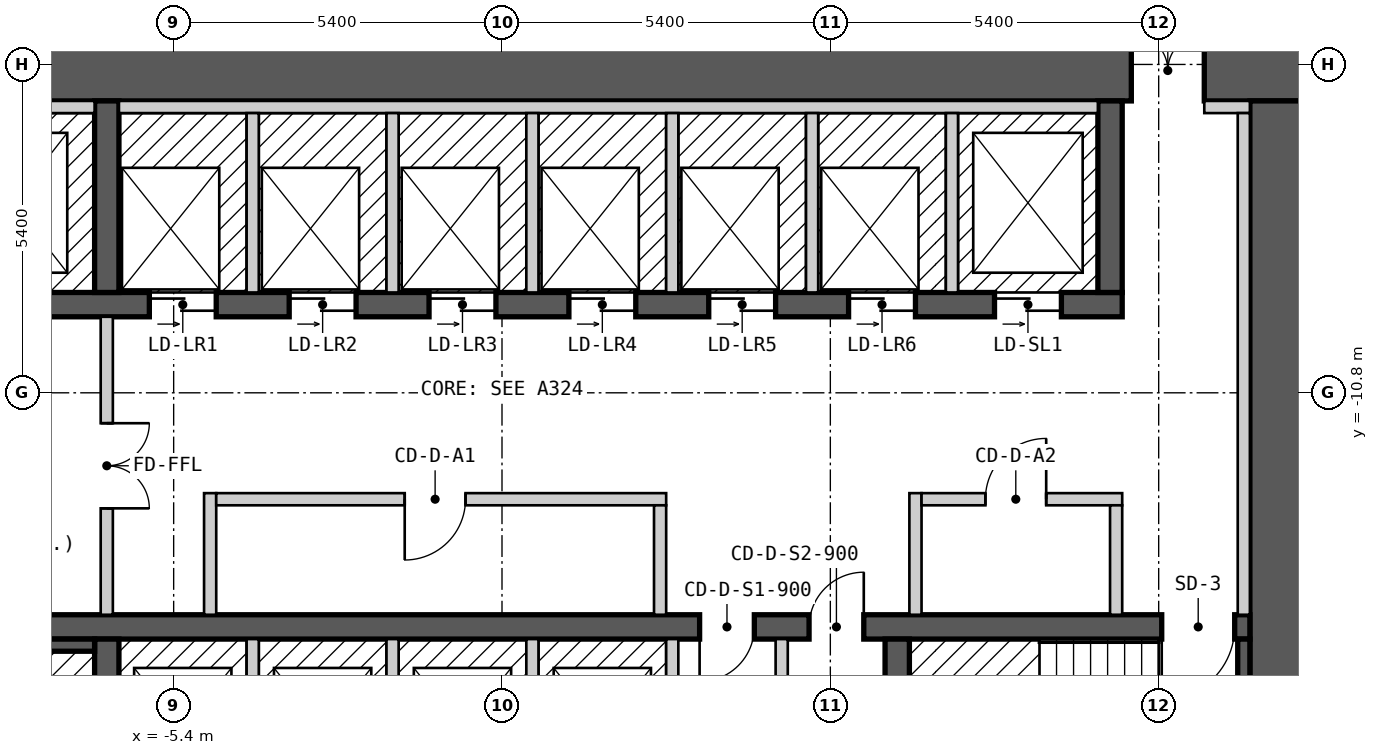
"""IFC4 building model, lengths in metres.
Left out: names, types, materials, properties, quantities, classifications, styles, units other than length and angle.
Written with IfcOpenShell. Run it as: python <this file> out.ifc"""

import sys

from ifc_helpers import new_model, si_unit, direction, frame, frame_2d, origin, place, context, subcontext, project, spatial, rectangle, extrude, element, fill, save


model = new_model("IFC4")
c1 = context("Model", 3, precision=1e-05, world=origin(), true_north=direction((0.0, 1.0)))
c2 = subcontext(c1, "Body", "Model", "MODEL_VIEW")
j1 = project(units=[si_unit("LENGTHUNIT", "METRE"), si_unit("PLANEANGLEUNIT", "RADIAN")], contexts=[c1])
p1 = place(None, origin())
s1 = spatial("IfcSite", under=j1, at=p1, CompositionType="ELEMENT")
p2 = place(p1, origin())
s2 = spatial("IfcBuilding", under=s1, at=p2, CompositionType="ELEMENT")
p3 = place(p2, frame((0.0, 0.0, 81.0)))
s3 = spatial("IfcBuildingStorey", under=s2, at=p3, CompositionType="ELEMENT", Elevation=81.0)
p4 = place(p3, frame((-13.3, -5.5, 0.0), z_axis=(0.0, 0.0, 1.0), x_axis=(1.0, 0.0, 0.0)))
e1 = element("IfcWall", 1, at=p4, inside=s3, PredefinedType="SHEAR", context=c2, shape_type="SweptSolid", body=[
    extrude(rectangle(XDim=26.6, YDim=1.0, at=frame_2d((13.3, 0.0))), origin(), (0.0, 0.0, 1.0), 2.7),
])
p5 = place(p4, frame((23.65, 0.0, 0.0)))
e2 = element("IfcOpeningElement", 2, at=p5, cuts=e1, PredefinedType="OPENING", context=c2, shape_type="SweptSolid", body=[
    extrude(rectangle(XDim=1.2, YDim=2.1, at=frame_2d((0.6, 1.05))), frame((0.0, 0.51, 0.0), z_axis=(0.0, -1.0, 0.0), x_axis=(1.0, 0.0, 0.0)), (0.0, 0.0, 1.0), 1.02),
])
p6 = place(p3, frame((12.8, -18.0, 0.0), z_axis=(0.0, 0.0, 1.0), x_axis=(0.0, 1.0, 0.0)))
e3 = element("IfcWall", 3, at=p6, inside=s3, PredefinedType="SHEAR", context=c2, shape_type="SweptSolid", body=[
    extrude(rectangle(XDim=12.0, YDim=1.0, at=frame_2d((6.0, 0.0))), origin(), (0.0, 0.0, 1.0), 2.7),
])
p7 = place(p3, frame((-12.3, -14.65, 0.0), z_axis=(0.0, 0.0, 1.0), x_axis=(1.0, 0.0, 0.0)))
e4 = element("IfcWall", 4, at=p7, inside=s3, PredefinedType="SHEAR", context=c2, shape_type="SweptSolid", body=[
    extrude(rectangle(XDim=24.6, YDim=0.4, at=frame_2d((12.3, 0.0))), origin(), (0.0, 0.0, 1.0), 2.7),
])
p8 = place(p7, frame((1.5, 0.0, 0.0), z_axis=(0.0, 0.0, 1.0), x_axis=(-1.0, 0.0, 0.0)))
e5 = element("IfcOpeningElement", 5, at=p8, cuts=e4, PredefinedType="OPENING", context=c2, shape_type="SweptSolid", body=[
    extrude(rectangle(XDim=1.2, YDim=2.1, at=frame_2d((0.6, 1.05))), frame((0.0, 0.21, 0.0), z_axis=(0.0, -1.0, 0.0), x_axis=(1.0, 0.0, 0.0)), (0.0, 0.0, 1.0), 0.42),
])
p9 = place(p7, frame((24.35, 0.0, 0.0), z_axis=(0.0, 0.0, 1.0), x_axis=(-1.0, 0.0, 0.0)))
e6 = element("IfcOpeningElement", 6, at=p9, cuts=e4, PredefinedType="OPENING", context=c2, shape_type="SweptSolid", body=[
    extrude(rectangle(XDim=1.2, YDim=2.1, at=frame_2d((0.6, 1.05))), frame((0.0, 0.21, 0.0), z_axis=(0.0, -1.0, 0.0), x_axis=(1.0, 0.0, 0.0)), (0.0, 0.0, 1.0), 0.42),
])
p10 = place(p7, frame((16.45, 0.0, 0.0), z_axis=(0.0, 0.0, 1.0), x_axis=(-1.0, 0.0, 0.0)))
e7 = element("IfcOpeningElement", 7, at=p10, cuts=e4, PredefinedType="OPENING", context=c2, shape_type="SweptSolid", body=[
    extrude(rectangle(XDim=0.9, YDim=2.1, at=frame_2d((0.45, 1.05))), frame((0.0, 0.21, 0.0), z_axis=(0.0, -1.0, 0.0), x_axis=(1.0, 0.0, 0.0)), (0.0, 0.0, 1.0), 0.42),
])
p11 = place(p7, frame((18.25, 0.0, 0.0), z_axis=(0.0, 0.0, 1.0), x_axis=(-1.0, 0.0, 0.0)))
e8 = element("IfcOpeningElement", 8, at=p11, cuts=e4, PredefinedType="OPENING", context=c2, shape_type="SweptSolid", body=[
    extrude(rectangle(XDim=0.9, YDim=2.1, at=frame_2d((0.45, 1.05))), frame((0.0, 0.21, 0.0), z_axis=(0.0, -1.0, 0.0), x_axis=(1.0, 0.0, 0.0)), (0.0, 0.0, 1.0), 0.42),
])
p12 = place(p3, frame((-12.3, -9.35, 0.0), z_axis=(0.0, 0.0, 1.0), x_axis=(1.0, 0.0, 0.0)))
e9 = element("IfcWall", 9, at=p12, inside=s3, PredefinedType="SHEAR", context=c2, shape_type="SweptSolid", body=[
    extrude(rectangle(XDim=22.5, YDim=0.4, at=frame_2d((11.25, 0.0))), origin(), (0.0, 0.0, 1.0), 2.7),
])
p13 = place(p12, frame((0.9, 0.0, 0.0)))
e10 = element("IfcOpeningElement", 10, at=p13, cuts=e9, PredefinedType="OPENING", context=c2, shape_type="SweptSolid", body=[
    extrude(rectangle(XDim=1.1, YDim=2.1, at=frame_2d((0.55, 1.05))), frame((0.0, 0.21, 0.0), z_axis=(0.0, -1.0, 0.0), x_axis=(1.0, 0.0, 0.0)), (0.0, 0.0, 1.0), 0.42),
])
p14 = place(p12, frame((3.7, 0.0, 0.0)))
e11 = element("IfcOpeningElement", 11, at=p14, cuts=e9, PredefinedType="OPENING", context=c2, shape_type="SweptSolid", body=[
    extrude(rectangle(XDim=1.1, YDim=2.1, at=frame_2d((0.55, 1.05))), frame((0.0, 0.21, 0.0), z_axis=(0.0, -1.0, 0.0), x_axis=(1.0, 0.0, 0.0)), (0.0, 0.0, 1.0), 0.42),
])
p15 = place(p12, frame((6.5, 0.0, 0.0)))
e12 = element("IfcOpeningElement", 12, at=p15, cuts=e9, PredefinedType="OPENING", context=c2, shape_type="SweptSolid", body=[
    extrude(rectangle(XDim=1.1, YDim=2.1, at=frame_2d((0.55, 1.05))), frame((0.0, 0.21, 0.0), z_axis=(0.0, -1.0, 0.0), x_axis=(1.0, 0.0, 0.0)), (0.0, 0.0, 1.0), 0.42),
])
p16 = place(p12, frame((8.8, 0.0, 0.0)))
e13 = element("IfcOpeningElement", 13, at=p16, cuts=e9, PredefinedType="OPENING", context=c2, shape_type="SweptSolid", body=[
    extrude(rectangle(XDim=1.1, YDim=2.1, at=frame_2d((0.55, 1.05))), frame((0.0, 0.21, 0.0), z_axis=(0.0, -1.0, 0.0), x_axis=(1.0, 0.0, 0.0)), (0.0, 0.0, 1.0), 0.42),
])
p17 = place(p12, frame((11.1, 0.0, 0.0)))
e14 = element("IfcOpeningElement", 14, at=p17, cuts=e9, PredefinedType="OPENING", context=c2, shape_type="SweptSolid", body=[
    extrude(rectangle(XDim=1.1, YDim=2.1, at=frame_2d((0.55, 1.05))), frame((0.0, 0.21, 0.0), z_axis=(0.0, -1.0, 0.0), x_axis=(1.0, 0.0, 0.0)), (0.0, 0.0, 1.0), 0.42),
])
p18 = place(p12, frame((13.4, 0.0, 0.0)))
e15 = element("IfcOpeningElement", 15, at=p18, cuts=e9, PredefinedType="OPENING", context=c2, shape_type="SweptSolid", body=[
    extrude(rectangle(XDim=1.1, YDim=2.1, at=frame_2d((0.55, 1.05))), frame((0.0, 0.21, 0.0), z_axis=(0.0, -1.0, 0.0), x_axis=(1.0, 0.0, 0.0)), (0.0, 0.0, 1.0), 0.42),
])
p19 = place(p12, frame((15.7, 0.0, 0.0)))
e16 = element("IfcOpeningElement", 16, at=p19, cuts=e9, PredefinedType="OPENING", context=c2, shape_type="SweptSolid", body=[
    extrude(rectangle(XDim=1.1, YDim=2.1, at=frame_2d((0.55, 1.05))), frame((0.0, 0.21, 0.0), z_axis=(0.0, -1.0, 0.0), x_axis=(1.0, 0.0, 0.0)), (0.0, 0.0, 1.0), 0.42),
])
p20 = place(p12, frame((18.0, 0.0, 0.0)))
e17 = element("IfcOpeningElement", 17, at=p20, cuts=e9, PredefinedType="OPENING", context=c2, shape_type="SweptSolid", body=[
    extrude(rectangle(XDim=1.1, YDim=2.1, at=frame_2d((0.55, 1.05))), frame((0.0, 0.21, 0.0), z_axis=(0.0, -1.0, 0.0), x_axis=(1.0, 0.0, 0.0)), (0.0, 0.0, 1.0), 0.42),
])
p21 = place(p12, frame((20.4, 0.0, 0.0)))
e18 = element("IfcOpeningElement", 18, at=p21, cuts=e9, PredefinedType="OPENING", context=c2, shape_type="SweptSolid", body=[
    extrude(rectangle(XDim=1.1, YDim=2.1, at=frame_2d((0.55, 1.05))), frame((0.0, 0.21, 0.0), z_axis=(0.0, -1.0, 0.0), x_axis=(1.0, 0.0, 0.0)), (0.0, 0.0, 1.0), 0.42),
])
for number, where, z_axis, x_axis in (
    (19, (-6.5, -18.0, 0.0), (0.0, 0.0, 1.0), (0.0, 1.0, 0.0)),
    (20, (6.5, -18.0, 0.0), (0.0, 0.0, 1.0), (0.0, 1.0, 0.0)),
    (21, (-6.5, -9.15, 0.0), (0.0, 0.0, 1.0), (0.0, 1.0, 0.0)),
    (22, (10.0, -9.15, 0.0), (0.0, 0.0, 1.0), (0.0, 1.0, 0.0)),
):
    element("IfcWall", number, at=place(p3, frame(where, z_axis=z_axis, x_axis=x_axis)), inside=s3, PredefinedType="SHEAR", context=c2, shape_type="SweptSolid", body=[
        extrude(rectangle(XDim=3.15, YDim=0.4, at=frame_2d((1.575, 0.0))), origin(), (0.0, 0.0, 1.0), 2.7),
    ])
p22 = place(p3, frame((-12.1, -6.1, 0.0), z_axis=(0.0, 0.0, 1.0), x_axis=(1.0, 0.0, 0.0)))
e23 = element("IfcWall", 23, at=p22, inside=s3, PredefinedType="SOLIDWALL", context=c2, shape_type="SweptSolid", body=[
    extrude(rectangle(XDim=5.4, YDim=0.2, at=frame_2d((2.7, 0.0))), origin(), (0.0, 0.0, 1.0), 2.7),
])
p23 = place(p3, frame((-10.8, -14.95, 0.0), z_axis=(0.0, 0.0, 1.0), x_axis=(1.0, 0.0, 0.0)))
e24 = element("IfcWall", 24, at=p23, inside=s3, PredefinedType="SOLIDWALL", context=c2, shape_type="SweptSolid", body=[
    extrude(rectangle(XDim=4.1, YDim=0.2, at=frame_2d((2.05, 0.0))), origin(), (0.0, 0.0, 1.0), 2.7),
])
p24 = place(p3, frame((-6.5, -14.45, 0.0), z_axis=(0.0, 0.0, 1.0), x_axis=(0.0, 1.0, 0.0)))
e25 = element("IfcWall", 25, at=p24, inside=s3, PredefinedType="PARTITIONING", context=c2, shape_type="SweptSolid", body=[
    extrude(rectangle(XDim=4.9, YDim=0.2, at=frame_2d((2.45, 0.0))), origin(), (0.0, 0.0, 1.0), 2.7),
])
p25 = place(p24, frame((3.15, 0.0, 0.0), z_axis=(0.0, 0.0, 1.0), x_axis=(-1.0, 0.0, 0.0)))
e26 = element("IfcOpeningElement", 26, at=p25, cuts=e25, PredefinedType="OPENING", context=c2, shape_type="SweptSolid", body=[
    extrude(rectangle(XDim=1.4, YDim=2.1, at=frame_2d((0.7, 1.05))), frame((0.0, 0.11, 0.0), z_axis=(0.0, -1.0, 0.0), x_axis=(1.0, 0.0, 0.0)), (0.0, 0.0, 1.0), 0.22),
])
p26 = place(p3, frame((-6.3, -6.1, 0.0), z_axis=(0.0, 0.0, 1.0), x_axis=(1.0, 0.0, 0.0)))
e27 = element("IfcWall", 27, at=p26, inside=s3, PredefinedType="SOLIDWALL", context=c2, shape_type="SweptSolid", body=[
    extrude(rectangle(XDim=16.1, YDim=0.2, at=frame_2d((8.05, 0.0))), origin(), (0.0, 0.0, 1.0), 2.7),
])
p27 = place(p3, frame((-4.8, -14.45, 0.0), z_axis=(0.0, 0.0, 1.0), x_axis=(0.0, 1.0, 0.0)))
e28 = element("IfcWall", 28, at=p27, inside=s3, PredefinedType="PARTITIONING", context=c2, shape_type="SweptSolid", body=[
    extrude(rectangle(XDim=2.0, YDim=0.2, at=frame_2d((1.0, 0.0))), origin(), (0.0, 0.0, 1.0), 2.7),
])
p28 = place(p3, frame((-4.7, -12.55, 0.0), z_axis=(0.0, 0.0, 1.0), x_axis=(1.0, 0.0, 0.0)))
e29 = element("IfcWall", 29, at=p28, inside=s3, PredefinedType="PARTITIONING", context=c2, shape_type="SweptSolid", body=[
    extrude(rectangle(XDim=7.4, YDim=0.2, at=frame_2d((3.7, 0.0))), origin(), (0.0, 0.0, 1.0), 2.7),
])
p29 = place(p28, frame((4.1, 0.0, 0.0), z_axis=(0.0, 0.0, 1.0), x_axis=(-1.0, 0.0, 0.0)))
e30 = element("IfcOpeningElement", 30, at=p29, cuts=e29, PredefinedType="OPENING", context=c2, shape_type="SweptSolid", body=[
    extrude(rectangle(XDim=1.0, YDim=2.1, at=frame_2d((0.5, 1.05))), frame((0.0, 0.11, 0.0), z_axis=(0.0, -1.0, 0.0), x_axis=(1.0, 0.0, 0.0)), (0.0, 0.0, 1.0), 0.22),
])
for number, where, z_axis, x_axis in (
    (31, (-4.1, -17.8, 0.0), (0.0, 0.0, 1.0), (0.0, 1.0, 0.0)),
    (32, (-4.1, -9.15, 0.0), (0.0, 0.0, 1.0), (0.0, 1.0, 0.0)),
    (33, (-1.8, -17.8, 0.0), (0.0, 0.0, 1.0), (0.0, 1.0, 0.0)),
    (34, (-1.8, -9.15, 0.0), (0.0, 0.0, 1.0), (0.0, 1.0, 0.0)),
    (35, (0.5, -17.8, 0.0), (0.0, 0.0, 1.0), (0.0, 1.0, 0.0)),
    (36, (0.5, -9.15, 0.0), (0.0, 0.0, 1.0), (0.0, 1.0, 0.0)),
):
    element("IfcWall", number, at=place(p3, frame(where, z_axis=z_axis, x_axis=x_axis)), inside=s3, PredefinedType="SOLIDWALL", context=c2, shape_type="SweptSolid", body=[
        extrude(rectangle(XDim=2.95, YDim=0.2, at=frame_2d((1.475, 0.0))), origin(), (0.0, 0.0, 1.0), 2.7),
    ])
p30 = place(p3, frame((2.6, -14.45, 0.0), z_axis=(0.0, 0.0, 1.0), x_axis=(0.0, 1.0, 0.0)))
e37 = element("IfcWall", 37, at=p30, inside=s3, PredefinedType="PARTITIONING", context=c2, shape_type="SweptSolid", body=[
    extrude(rectangle(XDim=1.8, YDim=0.2, at=frame_2d((0.9, 0.0))), origin(), (0.0, 0.0, 1.0), 2.7),
])
for number, where, z_axis, x_axis in (
    (38, (2.8, -17.8, 0.0), (0.0, 0.0, 1.0), (0.0, 1.0, 0.0)),
    (39, (2.8, -9.15, 0.0), (0.0, 0.0, 1.0), (0.0, 1.0, 0.0)),
):
    element("IfcWall", number, at=place(p3, frame(where, z_axis=z_axis, x_axis=x_axis)), inside=s3, PredefinedType="SOLIDWALL", context=c2, shape_type="SweptSolid", body=[
        extrude(rectangle(XDim=2.95, YDim=0.2, at=frame_2d((1.475, 0.0))), origin(), (0.0, 0.0, 1.0), 2.7),
    ])
p31 = place(p3, frame((4.6, -17.8, 0.0), z_axis=(0.0, 0.0, 1.0), x_axis=(0.0, 1.0, 0.0)))
e40 = element("IfcWall", 40, at=p31, inside=s3, PredefinedType="PARTITIONING", context=c2, shape_type="SweptSolid", body=[
    extrude(rectangle(XDim=2.95, YDim=0.2, at=frame_2d((1.475, 0.0))), origin(), (0.0, 0.0, 1.0), 2.7),
])
p32 = place(p3, frame((5.1, -9.15, 0.0), z_axis=(0.0, 0.0, 1.0), x_axis=(0.0, 1.0, 0.0)))
e41 = element("IfcWall", 41, at=p32, inside=s3, PredefinedType="SOLIDWALL", context=c2, shape_type="SweptSolid", body=[
    extrude(rectangle(XDim=2.95, YDim=0.2, at=frame_2d((1.475, 0.0))), origin(), (0.0, 0.0, 1.0), 2.7),
])
p33 = place(p3, frame((6.8, -14.45, 0.0), z_axis=(0.0, 0.0, 1.0), x_axis=(0.0, 1.0, 0.0)))
e42 = element("IfcWall", 42, at=p33, inside=s3, PredefinedType="PARTITIONING", context=c2, shape_type="SweptSolid", body=[
    extrude(rectangle(XDim=2.0, YDim=0.2, at=frame_2d((1.0, 0.0))), origin(), (0.0, 0.0, 1.0), 2.7),
])
p34 = place(p3, frame((6.9, -12.55, 0.0), z_axis=(0.0, 0.0, 1.0), x_axis=(1.0, 0.0, 0.0)))
e43 = element("IfcWall", 43, at=p34, inside=s3, PredefinedType="PARTITIONING", context=c2, shape_type="SweptSolid", body=[
    extrude(rectangle(XDim=3.3, YDim=0.2, at=frame_2d((1.65, 0.0))), origin(), (0.0, 0.0, 1.0), 2.7),
])
p35 = place(p34, frame((2.05, 0.0, 0.0), z_axis=(0.0, 0.0, 1.0), x_axis=(-1.0, 0.0, 0.0)))
e44 = element("IfcOpeningElement", 44, at=p35, cuts=e43, PredefinedType="OPENING", context=c2, shape_type="SweptSolid", body=[
    extrude(rectangle(XDim=1.0, YDim=2.1, at=frame_2d((0.5, 1.05))), frame((0.0, 0.11, 0.0), z_axis=(0.0, -1.0, 0.0), x_axis=(1.0, 0.0, 0.0)), (0.0, 0.0, 1.0), 0.22),
])
p36 = place(p3, frame((7.4, -9.15, 0.0), z_axis=(0.0, 0.0, 1.0), x_axis=(0.0, 1.0, 0.0)))
e45 = element("IfcWall", 45, at=p36, inside=s3, PredefinedType="SOLIDWALL", context=c2, shape_type="SweptSolid", body=[
    extrude(rectangle(XDim=2.95, YDim=0.2, at=frame_2d((1.475, 0.0))), origin(), (0.0, 0.0, 1.0), 2.7),
])
p37 = place(p3, frame((10.1, -14.45, 0.0), z_axis=(0.0, 0.0, 1.0), x_axis=(0.0, 1.0, 0.0)))
e46 = element("IfcWall", 46, at=p37, inside=s3, PredefinedType="PARTITIONING", context=c2, shape_type="SweptSolid", body=[
    extrude(rectangle(XDim=1.8, YDim=0.2, at=frame_2d((0.9, 0.0))), origin(), (0.0, 0.0, 1.0), 2.7),
])
p38 = place(p3, frame((11.55, -6.1, 0.0), z_axis=(0.0, 0.0, 1.0), x_axis=(1.0, 0.0, 0.0)))
e47 = element("IfcWall", 47, at=p38, inside=s3, PredefinedType="PARTITIONING", context=c2, shape_type="SweptSolid", body=[
    extrude(rectangle(XDim=0.75, YDim=0.2, at=frame_2d((0.375, 0.0))), origin(), (0.0, 0.0, 1.0), 2.7),
])
p39 = place(p3, frame((12.2, -17.6, 0.0), z_axis=(0.0, 0.0, 1.0), x_axis=(0.0, 1.0, 0.0)))
e48 = element("IfcWall", 48, at=p39, inside=s3, PredefinedType="SOLIDWALL", context=c2, shape_type="SweptSolid", body=[
    extrude(rectangle(XDim=2.75, YDim=0.2, at=frame_2d((1.375, 0.0))), origin(), (0.0, 0.0, 1.0), 2.7),
])
p40 = place(p3, frame((12.2, -14.45, 0.0), z_axis=(0.0, 0.0, 1.0), x_axis=(0.0, 1.0, 0.0)))
e49 = element("IfcWall", 49, at=p40, inside=s3, PredefinedType="PARTITIONING", context=c2, shape_type="SweptSolid", body=[
    extrude(rectangle(XDim=8.25, YDim=0.2, at=frame_2d((4.125, 0.0))), origin(), (0.0, 0.0, 1.0), 2.7),
])
p41 = place(p15, origin())
e50 = element("IfcDoor", 50, at=p41, inside=s3, OperationType="DOUBLE_DOOR_SLIDING", PredefinedType="DOOR", context=c2, shape_type="SweptSolid", body=[
    extrude(rectangle(XDim=1.1, YDim=2.1, at=frame_2d((0.55, 1.05))), frame((0.0, 0.025, 0.0), z_axis=(0.0, -1.0, 0.0), x_axis=(1.0, 0.0, 0.0)), (0.0, 0.0, 1.0), 0.05),
])
fill(e12, e50)
p42 = place(p16, origin())
e51 = element("IfcDoor", 51, at=p42, inside=s3, OperationType="DOUBLE_DOOR_SLIDING", PredefinedType="DOOR", context=c2, shape_type="SweptSolid", body=[
    extrude(rectangle(XDim=1.1, YDim=2.1, at=frame_2d((0.55, 1.05))), frame((0.0, 0.025, 0.0), z_axis=(0.0, -1.0, 0.0), x_axis=(1.0, 0.0, 0.0)), (0.0, 0.0, 1.0), 0.05),
])
fill(e13, e51)
p43 = place(p17, origin())
e52 = element("IfcDoor", 52, at=p43, inside=s3, OperationType="DOUBLE_DOOR_SLIDING", PredefinedType="DOOR", context=c2, shape_type="SweptSolid", body=[
    extrude(rectangle(XDim=1.1, YDim=2.1, at=frame_2d((0.55, 1.05))), frame((0.0, 0.025, 0.0), z_axis=(0.0, -1.0, 0.0), x_axis=(1.0, 0.0, 0.0)), (0.0, 0.0, 1.0), 0.05),
])
fill(e14, e52)
p44 = place(p18, origin())
e53 = element("IfcDoor", 53, at=p44, inside=s3, OperationType="DOUBLE_DOOR_SLIDING", PredefinedType="DOOR", context=c2, shape_type="SweptSolid", body=[
    extrude(rectangle(XDim=1.1, YDim=2.1, at=frame_2d((0.55, 1.05))), frame((0.0, 0.025, 0.0), z_axis=(0.0, -1.0, 0.0), x_axis=(1.0, 0.0, 0.0)), (0.0, 0.0, 1.0), 0.05),
])
fill(e15, e53)
p45 = place(p19, origin())
e54 = element("IfcDoor", 54, at=p45, inside=s3, OperationType="DOUBLE_DOOR_SLIDING", PredefinedType="DOOR", context=c2, shape_type="SweptSolid", body=[
    extrude(rectangle(XDim=1.1, YDim=2.1, at=frame_2d((0.55, 1.05))), frame((0.0, 0.025, 0.0), z_axis=(0.0, -1.0, 0.0), x_axis=(1.0, 0.0, 0.0)), (0.0, 0.0, 1.0), 0.05),
])
fill(e16, e54)
p46 = place(p20, origin())
e55 = element("IfcDoor", 55, at=p46, inside=s3, OperationType="DOUBLE_DOOR_SLIDING", PredefinedType="DOOR", context=c2, shape_type="SweptSolid", body=[
    extrude(rectangle(XDim=1.1, YDim=2.1, at=frame_2d((0.55, 1.05))), frame((0.0, 0.025, 0.0), z_axis=(0.0, -1.0, 0.0), x_axis=(1.0, 0.0, 0.0)), (0.0, 0.0, 1.0), 0.05),
])
fill(e17, e55)
p47 = place(p21, origin())
e56 = element("IfcDoor", 56, at=p47, inside=s3, OperationType="DOUBLE_DOOR_SLIDING", PredefinedType="DOOR", context=c2, shape_type="SweptSolid", body=[
    extrude(rectangle(XDim=1.1, YDim=2.1, at=frame_2d((0.55, 1.05))), frame((0.0, 0.025, 0.0), z_axis=(0.0, -1.0, 0.0), x_axis=(1.0, 0.0, 0.0)), (0.0, 0.0, 1.0), 0.05),
])
fill(e18, e56)
p48 = place(p9, origin())
e57 = element("IfcDoor", 57, at=p48, inside=s3, OperationType="SINGLE_SWING_RIGHT", PredefinedType="DOOR", context=c2, shape_type="SweptSolid", body=[
    extrude(rectangle(XDim=1.2, YDim=2.1, at=frame_2d((0.6, 1.05))), frame((0.0, 0.025, 0.0), z_axis=(0.0, -1.0, 0.0), x_axis=(1.0, 0.0, 0.0)), (0.0, 0.0, 1.0), 0.05),
])
fill(e6, e57)
p49 = place(p25, origin())
e58 = element("IfcDoor", 58, at=p49, inside=s3, OperationType="DOUBLE_DOOR_SINGLE_SWING", PredefinedType="DOOR", context=c2, shape_type="SweptSolid", body=[
    extrude(rectangle(XDim=1.4, YDim=2.1, at=frame_2d((0.7, 1.05))), frame((0.0, 0.025, 0.0), z_axis=(0.0, -1.0, 0.0), x_axis=(1.0, 0.0, 0.0)), (0.0, 0.0, 1.0), 0.05),
])
fill(e26, e58)
p50 = place(p5, origin())
e59 = element("IfcDoor", 59, at=p50, inside=s3, OperationType="DOUBLE_DOOR_SINGLE_SWING", PredefinedType="DOOR", context=c2, shape_type="SweptSolid", body=[
    extrude(rectangle(XDim=1.2, YDim=2.1, at=frame_2d((0.6, 1.05))), frame((0.0, 0.025, 0.0), z_axis=(0.0, -1.0, 0.0), x_axis=(1.0, 0.0, 0.0)), (0.0, 0.0, 1.0), 0.05),
])
fill(e2, e59)
p51 = place(p29, origin())
e60 = element("IfcDoor", 60, at=p51, inside=s3, OperationType="SINGLE_SWING_RIGHT", PredefinedType="DOOR", context=c2, shape_type="SweptSolid", body=[
    extrude(rectangle(XDim=1.0, YDim=2.1, at=frame_2d((0.5, 1.05))), frame((0.0, 0.025, 0.0), z_axis=(0.0, -1.0, 0.0), x_axis=(1.0, 0.0, 0.0)), (0.0, 0.0, 1.0), 0.05),
])
fill(e30, e60)
p52 = place(p35, origin())
e61 = element("IfcDoor", 61, at=p52, inside=s3, OperationType="SINGLE_SWING_LEFT", PredefinedType="DOOR", context=c2, shape_type="SweptSolid", body=[
    extrude(rectangle(XDim=1.0, YDim=2.1, at=frame_2d((0.5, 1.05))), frame((0.0, 0.025, 0.0), z_axis=(0.0, -1.0, 0.0), x_axis=(1.0, 0.0, 0.0)), (0.0, 0.0, 1.0), 0.05),
])
fill(e44, e61)
p53 = place(p10, origin())
e62 = element("IfcDoor", 62, at=p53, inside=s3, OperationType="SINGLE_SWING_RIGHT", PredefinedType="DOOR", context=c2, shape_type="SweptSolid", body=[
    extrude(rectangle(XDim=0.9, YDim=2.1, at=frame_2d((0.45, 1.05))), frame((0.0, 0.025, 0.0), z_axis=(0.0, -1.0, 0.0), x_axis=(1.0, 0.0, 0.0)), (0.0, 0.0, 1.0), 0.05),
])
fill(e7, e62)
p54 = place(p11, origin())
e63 = element("IfcDoor", 63, at=p54, inside=s3, OperationType="SINGLE_SWING_LEFT", PredefinedType="DOOR", context=c2, shape_type="SweptSolid", body=[
    extrude(rectangle(XDim=0.9, YDim=2.1, at=frame_2d((0.45, 1.05))), frame((0.0, 0.025, 0.0), z_axis=(0.0, -1.0, 0.0), x_axis=(1.0, 0.0, 0.0)), (0.0, 0.0, 1.0), 0.05),
])
fill(e8, e63)
save(model, sys.argv[1])
